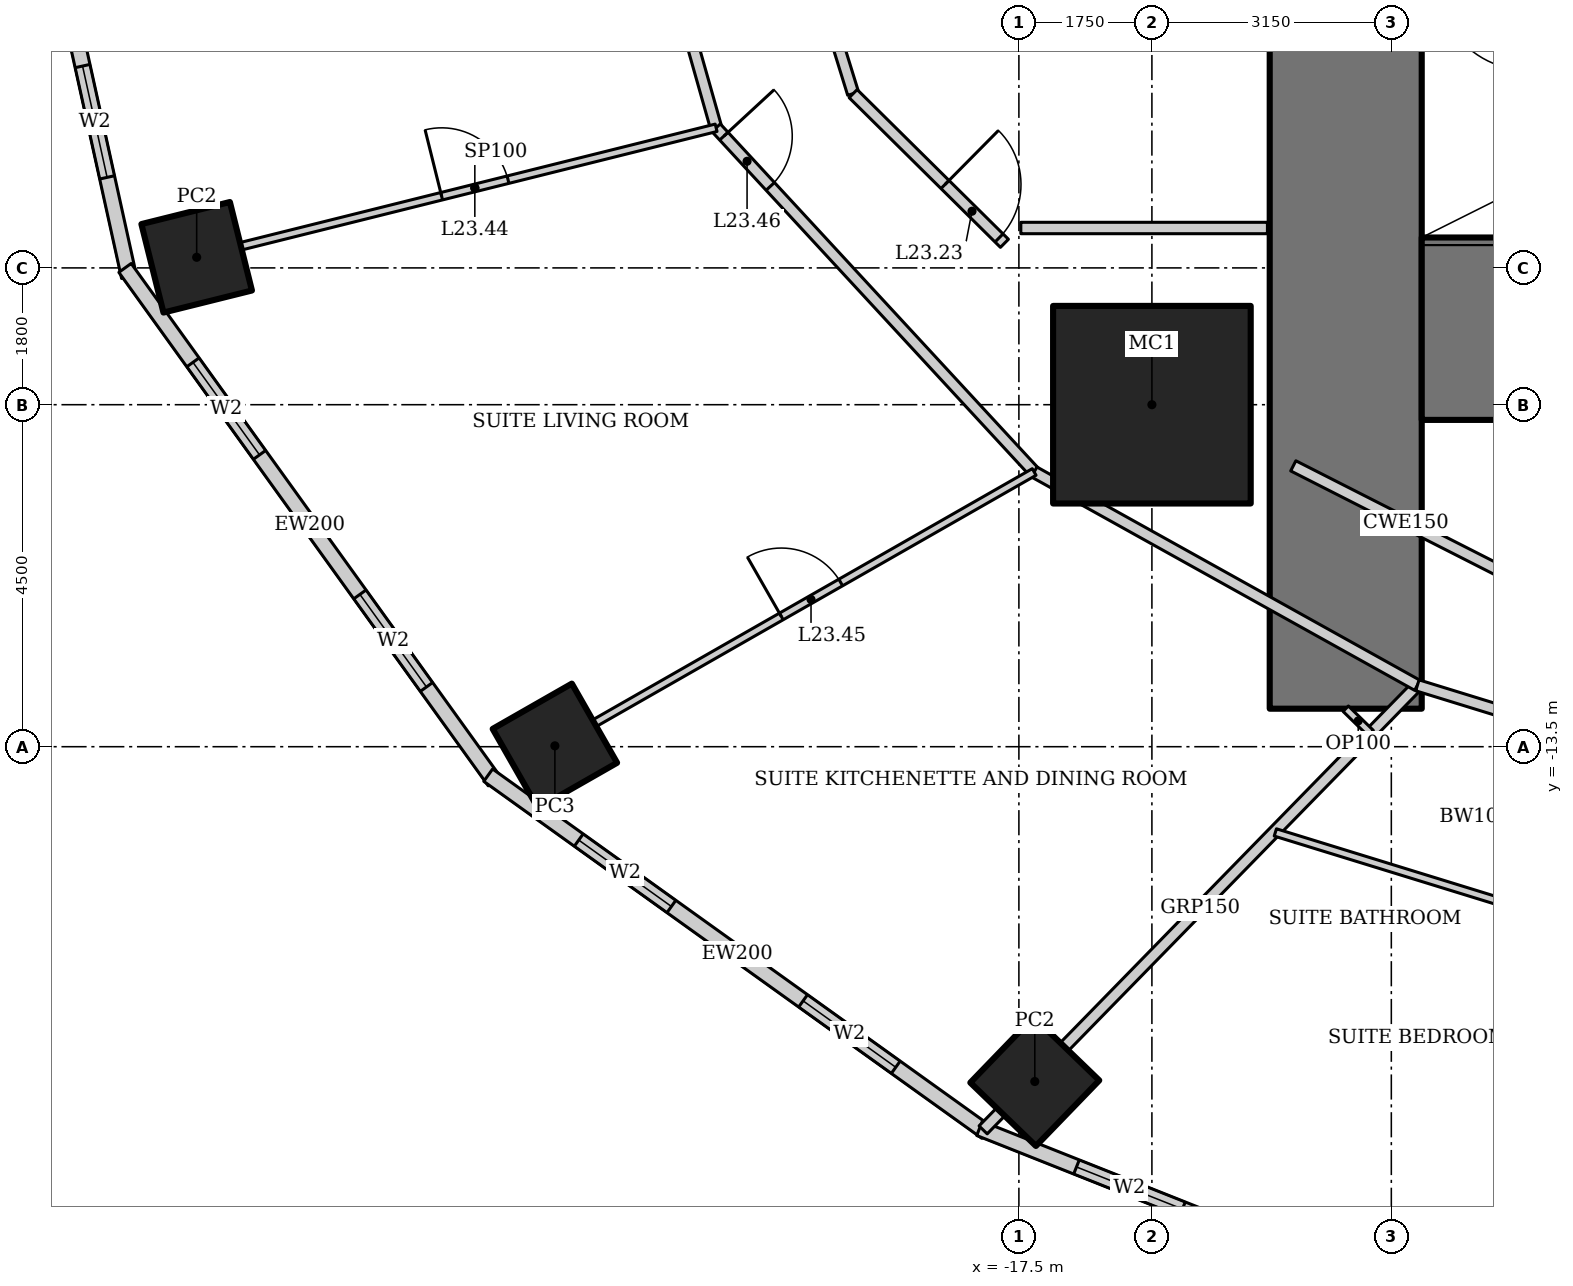
"""IFC4 building model, lengths in metres.
Left out: names, types, materials, properties, quantities, classifications, styles, units other than length and angle.
Written with IfcOpenShell. Run it as: python <this file> out.ifc"""

import sys

from ifc_helpers import new_model, si_unit, direction, frame, frame_2d, origin, origin_2d, place, context, subcontext, project, spatial, rectangle, hollow_rectangle, extrude, element, fill, save


model = new_model("IFC4")
c1 = context("Model", 3, precision=1e-05, world=origin(), true_north=direction((0.0, 1.0)))
c2 = subcontext(c1, "Body", "Model", "MODEL_VIEW")
j1 = project(units=[si_unit("LENGTHUNIT", "METRE"), si_unit("PLANEANGLEUNIT", "RADIAN")], contexts=[c1])
p1 = place(None, origin())
s1 = spatial("IfcSite", under=j1, at=p1, CompositionType="ELEMENT")
p2 = place(p1, origin())
s2 = spatial("IfcBuilding", under=s1, at=p2, CompositionType="ELEMENT")
p3 = place(p2, frame((0.0, 0.0, 98.2)))
s3 = spatial("IfcBuildingStorey", under=s2, at=p3, CompositionType="ELEMENT", Elevation=98.2)
p4 = place(p3, frame((-15.75, -9.0, 0.0), z_axis=(0.0, 0.0, 1.0), x_axis=(1.0, 0.0, 0.0)))
e1 = element("IfcColumn", 1, at=p4, inside=s3, PredefinedType="COLUMN", context=c2, shape_type="SweptSolid", body=[
    extrude(hollow_rectangle(XDim=2.6, YDim=2.6, WallThickness=0.13, at=origin_2d()), origin(), (0.0, 0.0, 1.0), 3.6),
])
p5 = place(p3, frame((-28.318, -7.06, 0.0), z_axis=(0.0, 0.0, 1.0), x_axis=(0.970295726276, 0.2419218956, 0.0)))
e2 = element("IfcColumn", 2, at=p5, inside=s3, PredefinedType="COLUMN", context=c2, shape_type="SweptSolid", body=[
    extrude(hollow_rectangle(XDim=1.2, YDim=1.2, WallThickness=0.1, at=origin_2d()), origin(), (0.0, 0.0, 1.0), 3.6),
])
p6 = place(p3, frame((-23.605, -13.489, 0.0), z_axis=(0.0, 0.0, 1.0), x_axis=(0.86824298017, 0.496139221777, 0.0)))
e3 = element("IfcColumn", 3, at=p6, inside=s3, PredefinedType="COLUMN", context=c2, shape_type="SweptSolid", body=[
    extrude(hollow_rectangle(XDim=1.2, YDim=1.2, WallThickness=0.12, at=origin_2d()), origin(), (0.0, 0.0, 1.0), 3.6),
])
p7 = place(p3, frame((-17.291, -17.905, 0.0), z_axis=(0.0, 0.0, 1.0), x_axis=(0.694658370459, 0.719339800339, 0.0)))
e4 = element("IfcColumn", 4, at=p7, inside=s3, PredefinedType="COLUMN", context=c2, shape_type="SweptSolid", body=[
    extrude(hollow_rectangle(XDim=1.2, YDim=1.2, WallThickness=0.1, at=origin_2d()), origin(), (0.0, 0.0, 1.0), 3.6),
])
p8 = place(p3, frame((-13.2, 13.0, 0.0), z_axis=(0.0, 0.0, 1.0), x_axis=(0.0, -1.0, 0.0)))
e5 = element("IfcWall", 5, at=p8, inside=s3, PredefinedType="SHEAR", context=c2, shape_type="SweptSolid", body=[
    extrude(rectangle(XDim=26.0, YDim=2.0, at=frame_2d((13.0, 0.0))), origin(), (0.0, 0.0, 1.0), 3.6),
])
p9 = place(p8, frame((12.1, 0.0, 0.0)))
e6 = element("IfcOpeningElement", 6, at=p9, cuts=e5, PredefinedType="OPENING", context=c2, shape_type="SweptSolid", body=[
    extrude(rectangle(XDim=1.8, YDim=2.1, at=frame_2d((0.9, 1.05))), frame((0.0, 1.01, 0.0), z_axis=(0.0, -1.0, 0.0), x_axis=(1.0, 0.0, 0.0)), (0.0, 0.0, 1.0), 2.02),
])
p10 = place(p3, frame((-12.2, -8.0, 0.0), z_axis=(0.0, 0.0, 1.0), x_axis=(1.0, 0.0, 0.0)))
e7 = element("IfcWall", 7, at=p10, inside=s3, PredefinedType="SHEAR", context=c2, shape_type="SweptSolid", body=[
    extrude(rectangle(XDim=24.4, YDim=2.4, at=frame_2d((12.2, 0.0))), origin(), (0.0, 0.0, 1.0), 3.6),
])
p11 = place(p3, frame((-30.835, 0.067, 0.0), z_axis=(0.0, 0.0, 1.0), x_axis=(0.215238065514, -0.976561608478, 0.0)))
e8 = element("IfcWall", 8, at=p11, inside=s3, PredefinedType="SOLIDWALL", context=c2, shape_type="SweptSolid", body=[
    extrude(rectangle(XDim=7.562, YDim=0.2, at=frame_2d((3.781, 0.0))), origin(), (0.0, 0.0, 1.0), 3.45),
])
p12 = place(p11, frame((1.341, 0.0, 0.5)))
e9 = element("IfcOpeningElement", 9, at=p12, cuts=e8, PredefinedType="OPENING", context=c2, shape_type="SweptSolid", body=[
    extrude(rectangle(XDim=1.5, YDim=2.2, at=frame_2d((0.75, 1.1))), frame((0.0, 0.11, 0.0), z_axis=(0.0, -1.0, 0.0), x_axis=(1.0, 0.0, 0.0)), (0.0, 0.0, 1.0), 0.22),
])
p13 = place(p11, frame((4.722, 0.0, 0.5)))
e10 = element("IfcOpeningElement", 10, at=p13, cuts=e8, PredefinedType="OPENING", context=c2, shape_type="SweptSolid", body=[
    extrude(rectangle(XDim=1.5, YDim=2.2, at=frame_2d((0.75, 1.1))), frame((0.0, 0.11, 0.0), z_axis=(0.0, -1.0, 0.0), x_axis=(1.0, 0.0, 0.0)), (0.0, 0.0, 1.0), 0.22),
])
p14 = place(p3, frame((-29.26, -7.2, 0.0), z_axis=(0.0, 0.0, 1.0), x_axis=(0.583937613703, -0.811798536155, 0.0)))
e11 = element("IfcWall", 11, at=p14, inside=s3, PredefinedType="SOLIDWALL", context=c2, shape_type="SweptSolid", body=[
    extrude(rectangle(XDim=8.323, YDim=0.2, at=frame_2d((4.162, 0.0))), origin(), (0.0, 0.0, 1.0), 3.45),
])
p15 = place(p14, frame((1.531, 0.0, 0.5)))
e12 = element("IfcOpeningElement", 12, at=p15, cuts=e11, PredefinedType="OPENING", context=c2, shape_type="SweptSolid", body=[
    extrude(rectangle(XDim=1.5, YDim=2.2, at=frame_2d((0.75, 1.1))), frame((0.0, 0.11, 0.0), z_axis=(0.0, -1.0, 0.0), x_axis=(1.0, 0.0, 0.0)), (0.0, 0.0, 1.0), 0.22),
])
p16 = place(p14, frame((5.292, 0.0, 0.5)))
e13 = element("IfcOpeningElement", 13, at=p16, cuts=e11, PredefinedType="OPENING", context=c2, shape_type="SweptSolid", body=[
    extrude(rectangle(XDim=1.5, YDim=2.2, at=frame_2d((0.75, 1.1))), frame((0.0, 0.11, 0.0), z_axis=(0.0, -1.0, 0.0), x_axis=(1.0, 0.0, 0.0)), (0.0, 0.0, 1.0), 0.22),
])
p17 = place(p3, frame((-24.482, -13.875, 0.0), z_axis=(0.0, 0.0, 1.0), x_axis=(0.812791321576, -0.582554948112, 0.0)))
e14 = element("IfcWall", 14, at=p17, inside=s3, PredefinedType="SOLIDWALL", context=c2, shape_type="SweptSolid", body=[
    extrude(rectangle(XDim=8.063, YDim=0.2, at=frame_2d((4.032, 0.0))), origin(), (0.0, 0.0, 1.0), 3.45),
])
p18 = place(p17, frame((1.466, 0.0, 0.5)))
e15 = element("IfcOpeningElement", 15, at=p18, cuts=e14, PredefinedType="OPENING", context=c2, shape_type="SweptSolid", body=[
    extrude(rectangle(XDim=1.5, YDim=2.2, at=frame_2d((0.75, 1.1))), frame((0.0, 0.11, 0.0), z_axis=(0.0, -1.0, 0.0), x_axis=(1.0, 0.0, 0.0)), (0.0, 0.0, 1.0), 0.22),
])
p19 = place(p17, frame((5.097, 0.0, 0.5)))
e16 = element("IfcOpeningElement", 16, at=p19, cuts=e14, PredefinedType="OPENING", context=c2, shape_type="SweptSolid", body=[
    extrude(rectangle(XDim=1.5, YDim=2.2, at=frame_2d((0.75, 1.1))), frame((0.0, 0.11, 0.0), z_axis=(0.0, -1.0, 0.0), x_axis=(1.0, 0.0, 0.0)), (0.0, 0.0, 1.0), 0.22),
])
p20 = place(p3, frame((-18.018, -18.523, 0.0), z_axis=(0.0, 0.0, 1.0), x_axis=(0.929358351251, -0.369178892895, 0.0)))
e17 = element("IfcWall", 17, at=p20, inside=s3, PredefinedType="SOLIDWALL", context=c2, shape_type="SweptSolid", body=[
    extrude(rectangle(XDim=7.692, YDim=0.2, at=frame_2d((3.846, 0.0))), origin(), (0.0, 0.0, 1.0), 3.45),
])
p21 = place(p20, frame((1.373, 0.0, 0.5)))
e18 = element("IfcOpeningElement", 18, at=p21, cuts=e17, PredefinedType="OPENING", context=c2, shape_type="SweptSolid", body=[
    extrude(rectangle(XDim=1.5, YDim=2.2, at=frame_2d((0.75, 1.1))), frame((0.0, 0.11, 0.0), z_axis=(0.0, -1.0, 0.0), x_axis=(1.0, 0.0, 0.0)), (0.0, 0.0, 1.0), 0.22),
])
p22 = place(p20, frame((4.819, 0.0, 0.5)))
e19 = element("IfcOpeningElement", 19, at=p22, cuts=e17, PredefinedType="OPENING", context=c2, shape_type="SweptSolid", body=[
    extrude(rectangle(XDim=1.5, YDim=2.2, at=frame_2d((0.75, 1.1))), frame((0.0, 0.11, 0.0), z_axis=(0.0, -1.0, 0.0), x_axis=(1.0, 0.0, 0.0)), (0.0, 0.0, 1.0), 0.22),
])
p23 = place(p3, frame((-17.97, -18.542, 0.0), z_axis=(0.0, 0.0, 1.0), x_axis=(0.698757291878, 0.715358823981, 0.0)))
e20 = element("IfcWall", 20, at=p23, inside=s3, PredefinedType="PARTITIONING", context=c2, shape_type="SweptSolid", body=[
    extrude(rectangle(XDim=8.177, YDim=0.15, at=frame_2d((4.088, 0.0))), origin(), (0.0, 0.0, 1.0), 2.528),
])
p24 = place(p3, frame((-23.0, 0.0, 0.0), z_axis=(0.0, 0.0, 1.0), x_axis=(0.272386051236, -0.962188047677, 0.0)))
e21 = element("IfcWall", 21, at=p24, inside=s3, PredefinedType="PARTITIONING", context=c2, shape_type="SweptSolid", body=[
    extrude(rectangle(XDim=5.567, YDim=0.15, at=frame_2d((2.783, 0.0))), origin(), (0.0, 0.0, 1.0), 3.45),
])
p25 = place(p3, frame((-21.484, -5.356, 0.0), z_axis=(0.0, 0.0, 1.0), x_axis=(0.678641806296, -0.734469399463, 0.0)))
e22 = element("IfcWall", 22, at=p25, inside=s3, PredefinedType="PARTITIONING", context=c2, shape_type="SweptSolid", body=[
    extrude(rectangle(XDim=6.166, YDim=0.15, at=frame_2d((3.083, 0.0))), origin(), (0.0, 0.0, 1.0), 3.45),
])
p26 = place(p25, frame((0.15, 0.0, 0.0)))
e23 = element("IfcOpeningElement", 23, at=p26, cuts=e22, PredefinedType="OPENING", context=c2, shape_type="SweptSolid", body=[
    extrude(rectangle(XDim=0.9, YDim=2.1, at=frame_2d((0.45, 1.05))), frame((0.0, 0.085, 0.0), z_axis=(0.0, -1.0, 0.0), x_axis=(1.0, 0.0, 0.0)), (0.0, 0.0, 1.0), 0.17),
])
p27 = place(p3, frame((-17.299, -9.885, 0.0), z_axis=(0.0, 0.0, 1.0), x_axis=(0.873695910579, -0.486472461541, 0.0)))
e24 = element("IfcWall", 24, at=p27, inside=s3, PredefinedType="PARTITIONING", context=c2, shape_type="SweptSolid", body=[
    extrude(rectangle(XDim=5.771, YDim=0.15, at=frame_2d((2.885, 0.0))), origin(), (0.0, 0.0, 1.0), 3.45),
])
p28 = place(p3, frame((-12.257, -12.693, 0.0), z_axis=(0.0, 0.0, 1.0), x_axis=(0.955657956744, -0.294478980085, 0.0)))
e25 = element("IfcWall", 25, at=p28, inside=s3, PredefinedType="PARTITIONING", context=c2, shape_type="SweptSolid", body=[
    extrude(rectangle(XDim=5.236, YDim=0.15, at=frame_2d((2.618, 0.0))), origin(), (0.0, 0.0, 1.0), 3.45),
])
p29 = place(p3, frame((-20.921, -0.9, 0.0), z_axis=(0.0, 0.0, 1.0), x_axis=(0.295778570807, -0.955256529447, 0.0)))
e26 = element("IfcWall", 26, at=p29, inside=s3, PredefinedType="PARTITIONING", context=c2, shape_type="SweptSolid", body=[
    extrude(rectangle(XDim=4.195, YDim=0.15, at=frame_2d((2.097, 0.0))), origin(), (0.0, 0.0, 1.0), 3.45),
])
p30 = place(p3, frame((-27.833, -6.939, 0.0), z_axis=(0.0, 0.0, 1.0), x_axis=(0.970295936837, 0.241921051083, 0.0)))
e27 = element("IfcWall", 27, at=p30, inside=s3, PredefinedType="PARTITIONING", context=c2, shape_type="SweptSolid", body=[
    extrude(rectangle(XDim=6.543, YDim=0.1, at=frame_2d((3.272, 0.0))), origin(), (0.0, 0.0, 1.0), 2.333),
])
p31 = place(p30, frame((2.822, 0.0, 0.0)))
e28 = element("IfcOpeningElement", 28, at=p31, cuts=e27, PredefinedType="OPENING", context=c2, shape_type="SweptSolid", body=[
    extrude(rectangle(XDim=0.9, YDim=2.1, at=frame_2d((0.45, 1.05))), frame((0.0, 0.06, 0.0), z_axis=(0.0, -1.0, 0.0), x_axis=(1.0, 0.0, 0.0)), (0.0, 0.0, 1.0), 0.12),
])
p32 = place(p3, frame((-23.171, -13.24, 0.0), z_axis=(0.0, 0.0, 1.0), x_axis=(0.868249806728, 0.496127275118, 0.0)))
e29 = element("IfcWall", 29, at=p32, inside=s3, PredefinedType="PARTITIONING", context=c2, shape_type="SweptSolid", body=[
    extrude(rectangle(XDim=6.763, YDim=0.1, at=frame_2d((3.381, 0.0))), origin(), (0.0, 0.0, 1.0), 2.693),
])
p33 = place(p32, frame((2.931, 0.0, 0.0)))
e30 = element("IfcOpeningElement", 30, at=p33, cuts=e29, PredefinedType="OPENING", context=c2, shape_type="SweptSolid", body=[
    extrude(rectangle(XDim=0.9, YDim=2.1, at=frame_2d((0.45, 1.05))), frame((0.0, 0.06, 0.0), z_axis=(0.0, -1.0, 0.0), x_axis=(1.0, 0.0, 0.0)), (0.0, 0.0, 1.0), 0.12),
])
p34 = place(p3, frame((-11.052, -15.575, 0.0), z_axis=(0.0, 0.0, 1.0), x_axis=(-0.955641033268, 0.294533895391, 0.0)))
e31 = element("IfcWall", 31, at=p34, inside=s3, PredefinedType="PARTITIONING", context=c2, shape_type="SweptSolid", body=[
    extrude(rectangle(XDim=3.216, YDim=0.1, at=frame_2d((1.608, 0.0))), origin(), (0.0, 0.0, 1.0), 3.45),
])
p35 = place(p3, frame((-13.2, -13.0, 0.0), z_axis=(0.0, 0.0, 1.0), x_axis=(0.715289751842, -0.698827998087, 0.0)))
e32 = element("IfcWall", 32, at=p35, inside=s3, PredefinedType="PARTITIONING", context=c2, shape_type="SweptSolid", body=[
    extrude(rectangle(XDim=0.46, YDim=0.1, at=frame_2d((0.23, 0.0))), origin(), (0.0, 0.0, 1.0), 3.45),
])
p36 = place(p3, frame((-19.681, -4.907, 0.0), z_axis=(0.0, 0.0, 1.0), x_axis=(0.710845937688, -0.70334774676, 0.0)))
e33 = element("IfcWall", 33, at=p36, inside=s3, PredefinedType="PARTITIONING", context=c2, shape_type="SweptSolid", body=[
    extrude(rectangle(XDim=2.8, YDim=0.15, at=frame_2d((1.4, 0.0))), origin(), (0.0, 0.0, 1.0), 3.45),
])
p37 = place(p36, frame((1.7, 0.0, 0.0)))
e34 = element("IfcOpeningElement", 34, at=p37, cuts=e33, PredefinedType="OPENING", context=c2, shape_type="SweptSolid", body=[
    extrude(rectangle(XDim=1.0, YDim=2.1, at=frame_2d((0.5, 1.05))), frame((0.0, 0.085, 0.0), z_axis=(0.0, -1.0, 0.0), x_axis=(1.0, 0.0, 0.0)), (0.0, 0.0, 1.0), 0.17),
])
p38 = place(p3, frame((-13.89, -9.805, 0.0), z_axis=(0.0, 0.0, 1.0), x_axis=(0.891398195277, -0.453220980821, 0.0)))
e35 = element("IfcWall", 35, at=p38, inside=s3, PredefinedType="PARTITIONING", context=c2, shape_type="SweptSolid", body=[
    extrude(rectangle(XDim=3.327, YDim=0.15, at=frame_2d((1.664, 0.0))), origin(), (0.0, 0.0, 1.0), 3.45),
])
p39 = place(p3, frame((-17.475, -6.675, 0.0), z_axis=(0.0, 0.0, 1.0), x_axis=(1.0, 0.0, 0.0)))
e36 = element("IfcWall", 36, at=p39, inside=s3, PredefinedType="PARTITIONING", context=c2, shape_type="SweptSolid", body=[
    extrude(rectangle(XDim=3.245, YDim=0.15, at=frame_2d((1.622, 0.0))), origin(), (0.0, 0.0, 1.0), 3.45),
])
p40 = place(p13, origin())
e37 = element("IfcWindow", 37, at=p40, inside=s3, PartitioningType="SINGLE_PANEL", PredefinedType="WINDOW", context=c2, shape_type="SweptSolid", body=[
    extrude(rectangle(XDim=1.5, YDim=2.2, at=frame_2d((0.75, 1.1))), frame((0.0, 0.03, 0.0), z_axis=(0.0, -1.0, 0.0), x_axis=(1.0, 0.0, 0.0)), (0.0, 0.0, 1.0), 0.06),
])
fill(e10, e37)
p41 = place(p15, origin())
e38 = element("IfcWindow", 38, at=p41, inside=s3, PartitioningType="SINGLE_PANEL", PredefinedType="WINDOW", context=c2, shape_type="SweptSolid", body=[
    extrude(rectangle(XDim=1.5, YDim=2.2, at=frame_2d((0.75, 1.1))), frame((0.0, 0.03, 0.0), z_axis=(0.0, -1.0, 0.0), x_axis=(1.0, 0.0, 0.0)), (0.0, 0.0, 1.0), 0.06),
])
fill(e12, e38)
p42 = place(p16, origin())
e39 = element("IfcWindow", 39, at=p42, inside=s3, PartitioningType="SINGLE_PANEL", PredefinedType="WINDOW", context=c2, shape_type="SweptSolid", body=[
    extrude(rectangle(XDim=1.5, YDim=2.2, at=frame_2d((0.75, 1.1))), frame((0.0, 0.03, 0.0), z_axis=(0.0, -1.0, 0.0), x_axis=(1.0, 0.0, 0.0)), (0.0, 0.0, 1.0), 0.06),
])
fill(e13, e39)
p43 = place(p18, origin())
e40 = element("IfcWindow", 40, at=p43, inside=s3, PartitioningType="SINGLE_PANEL", PredefinedType="WINDOW", context=c2, shape_type="SweptSolid", body=[
    extrude(rectangle(XDim=1.5, YDim=2.2, at=frame_2d((0.75, 1.1))), frame((0.0, 0.03, 0.0), z_axis=(0.0, -1.0, 0.0), x_axis=(1.0, 0.0, 0.0)), (0.0, 0.0, 1.0), 0.06),
])
fill(e15, e40)
p44 = place(p19, origin())
e41 = element("IfcWindow", 41, at=p44, inside=s3, PartitioningType="SINGLE_PANEL", PredefinedType="WINDOW", context=c2, shape_type="SweptSolid", body=[
    extrude(rectangle(XDim=1.5, YDim=2.2, at=frame_2d((0.75, 1.1))), frame((0.0, 0.03, 0.0), z_axis=(0.0, -1.0, 0.0), x_axis=(1.0, 0.0, 0.0)), (0.0, 0.0, 1.0), 0.06),
])
fill(e16, e41)
p45 = place(p21, origin())
e42 = element("IfcWindow", 42, at=p45, inside=s3, PartitioningType="SINGLE_PANEL", PredefinedType="WINDOW", context=c2, shape_type="SweptSolid", body=[
    extrude(rectangle(XDim=1.5, YDim=2.2, at=frame_2d((0.75, 1.1))), frame((0.0, 0.03, 0.0), z_axis=(0.0, -1.0, 0.0), x_axis=(1.0, 0.0, 0.0)), (0.0, 0.0, 1.0), 0.06),
])
fill(e18, e42)
p46 = place(p37, origin())
e43 = element("IfcDoor", 43, at=p46, inside=s3, OperationType="SINGLE_SWING_LEFT", PredefinedType="DOOR", context=c2, shape_type="SweptSolid", body=[
    extrude(rectangle(XDim=1.0, YDim=2.1, at=frame_2d((0.5, 1.05))), frame((0.0, 0.025, 0.0), z_axis=(0.0, -1.0, 0.0), x_axis=(1.0, 0.0, 0.0)), (0.0, 0.0, 1.0), 0.05),
])
fill(e34, e43)
p47 = place(p31, origin())
e44 = element("IfcDoor", 44, at=p47, inside=s3, OperationType="SINGLE_SWING_LEFT", PredefinedType="DOOR", context=c2, shape_type="SweptSolid", body=[
    extrude(rectangle(XDim=0.9, YDim=2.1, at=frame_2d((0.45, 1.05))), frame((0.0, 0.025, 0.0), z_axis=(0.0, -1.0, 0.0), x_axis=(1.0, 0.0, 0.0)), (0.0, 0.0, 1.0), 0.05),
])
fill(e28, e44)
p48 = place(p33, origin())
e45 = element("IfcDoor", 45, at=p48, inside=s3, OperationType="SINGLE_SWING_LEFT", PredefinedType="DOOR", context=c2, shape_type="SweptSolid", body=[
    extrude(rectangle(XDim=0.9, YDim=2.1, at=frame_2d((0.45, 1.05))), frame((0.0, 0.025, 0.0), z_axis=(0.0, -1.0, 0.0), x_axis=(1.0, 0.0, 0.0)), (0.0, 0.0, 1.0), 0.05),
])
fill(e30, e45)
p49 = place(p26, origin())
e46 = element("IfcDoor", 46, at=p49, inside=s3, OperationType="SINGLE_SWING_LEFT", PredefinedType="DOOR", context=c2, shape_type="SweptSolid", body=[
    extrude(rectangle(XDim=0.9, YDim=2.1, at=frame_2d((0.45, 1.05))), frame((0.0, 0.025, 0.0), z_axis=(0.0, -1.0, 0.0), x_axis=(1.0, 0.0, 0.0)), (0.0, 0.0, 1.0), 0.05),
])
fill(e23, e46)
save(model, sys.argv[1])
